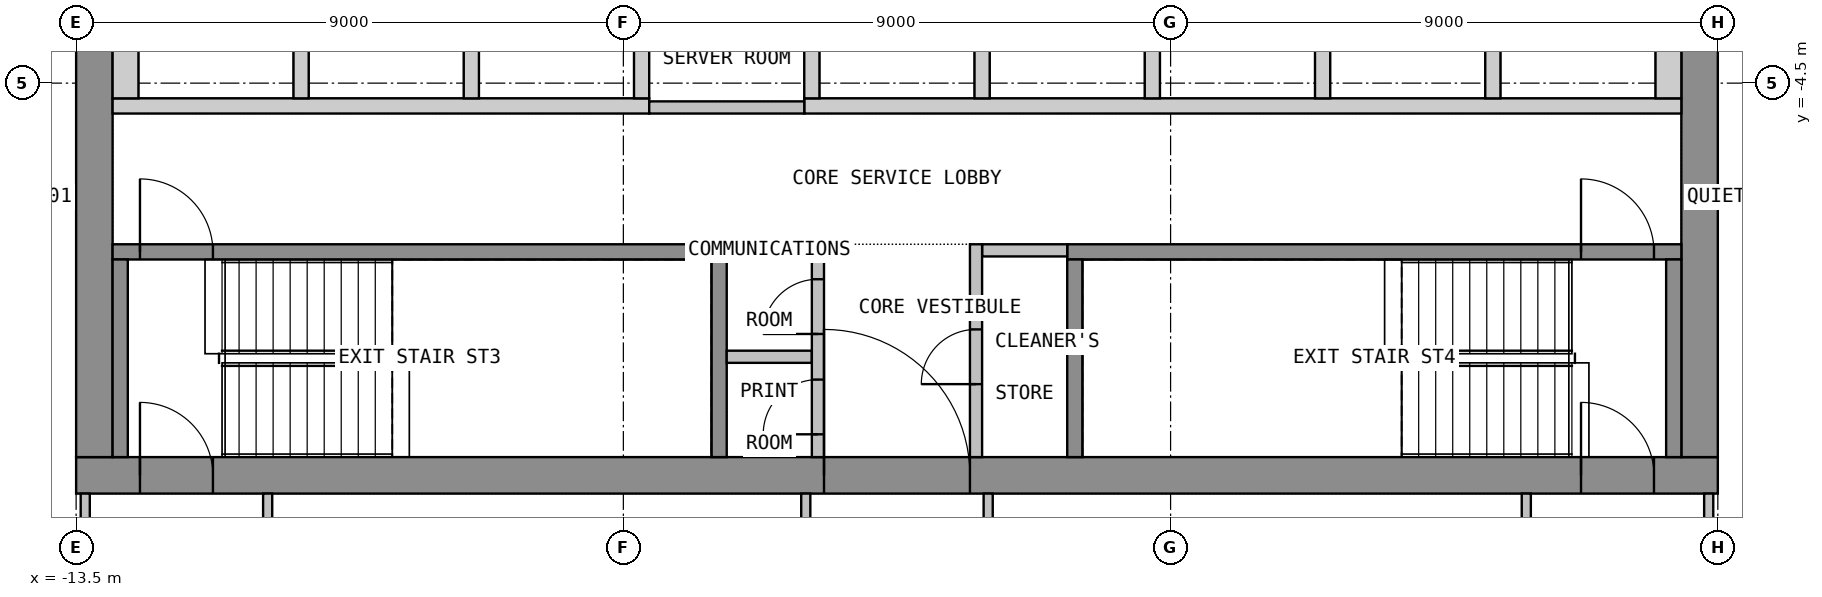
"""IFC4 building model, lengths in metres.
Left out: names, types, materials, properties, quantities, classifications, styles, units other than length and angle.
Written with IfcOpenShell. Run it as: python <this file> out.ifc"""

import sys

from ifc_helpers import new_model, si_unit, direction, frame, frame_2d, origin, place, context, subcontext, project, spatial, polyline, rectangle, outline, extrude, element, fill, save


model = new_model("IFC4")
c1 = context("Model", 3, precision=1e-05, world=origin(), true_north=direction((0.0, 1.0)))
c2 = subcontext(c1, "Body", "Model", "MODEL_VIEW")
j1 = project(units=[si_unit("LENGTHUNIT", "METRE"), si_unit("PLANEANGLEUNIT", "RADIAN")], contexts=[c1])
p1 = place(None, origin())
s1 = spatial("IfcSite", under=j1, at=p1, CompositionType="ELEMENT")
p2 = place(p1, origin())
s2 = spatial("IfcBuilding", under=s1, at=p2, CompositionType="ELEMENT")
p3 = place(p2, frame((0.0, 0.0, 183.9)))
s3 = spatial("IfcBuildingStorey", under=s2, at=p3, CompositionType="ELEMENT", Elevation=183.9)
p4 = place(p3, frame((-13.5, -10.95, 0.0), z_axis=(0.0, 0.0, 1.0), x_axis=(1.0, 0.0, 0.0)))
e1 = element("IfcWall", 1, at=p4, inside=s3, PredefinedType="SHEAR", context=c2, shape_type="SweptSolid", body=[
    extrude(rectangle(XDim=27.0, YDim=0.6, at=frame_2d((13.5, 0.0))), origin(), (0.0, 0.0, 1.0), 3.55),
])
p5 = place(p4, frame((12.3, 0.0, 0.0)))
e2 = element("IfcOpeningElement", 2, at=p5, cuts=e1, PredefinedType="OPENING", context=c2, shape_type="SweptSolid", body=[
    extrude(rectangle(XDim=2.4, YDim=2.1, at=frame_2d((1.2, 1.05))), frame((0.0, 0.31, 0.0), z_axis=(0.0, -1.0, 0.0), x_axis=(1.0, 0.0, 0.0)), (0.0, 0.0, 1.0), 0.62),
])
p6 = place(p4, frame((1.05, 0.0, 0.0)))
e3 = element("IfcOpeningElement", 3, at=p6, cuts=e1, PredefinedType="OPENING", context=c2, shape_type="SweptSolid", body=[
    extrude(rectangle(XDim=1.2, YDim=2.1, at=frame_2d((0.6, 1.05))), frame((0.0, 0.31, 0.0), z_axis=(0.0, -1.0, 0.0), x_axis=(1.0, 0.0, 0.0)), (0.0, 0.0, 1.0), 0.62),
])
p7 = place(p4, frame((24.75, 0.0, 0.0)))
e4 = element("IfcOpeningElement", 4, at=p7, cuts=e1, PredefinedType="OPENING", context=c2, shape_type="SweptSolid", body=[
    extrude(rectangle(XDim=1.2, YDim=2.1, at=frame_2d((0.6, 1.05))), frame((0.0, 0.31, 0.0), z_axis=(0.0, -1.0, 0.0), x_axis=(1.0, 0.0, 0.0)), (0.0, 0.0, 1.0), 0.62),
])
p8 = place(p3, frame((-13.2, -10.65, 0.0), z_axis=(0.0, 0.0, 1.0), x_axis=(0.0, 1.0, 0.0)))
e5 = element("IfcWall", 5, at=p8, inside=s3, PredefinedType="SHEAR", context=c2, shape_type="SweptSolid", body=[
    extrude(rectangle(XDim=21.3, YDim=0.6, at=frame_2d((10.65, 0.0))), origin(), (0.0, 0.0, 1.0), 3.55),
])
p9 = place(p8, frame((9.45, 0.0, 0.0)))
e6 = element("IfcOpeningElement", 6, at=p9, cuts=e5, PredefinedType="OPENING", context=c2, shape_type="SweptSolid", body=[
    extrude(rectangle(XDim=2.4, YDim=2.1, at=frame_2d((1.2, 1.05))), frame((0.0, 0.31, 0.0), z_axis=(0.0, -1.0, 0.0), x_axis=(1.0, 0.0, 0.0)), (0.0, 0.0, 1.0), 0.62),
])
p10 = place(p3, frame((13.2, -10.65, 0.0), z_axis=(0.0, 0.0, 1.0), x_axis=(0.0, 1.0, 0.0)))
e7 = element("IfcWall", 7, at=p10, inside=s3, PredefinedType="SHEAR", context=c2, shape_type="SweptSolid", body=[
    extrude(rectangle(XDim=21.3, YDim=0.6, at=frame_2d((10.65, 0.0))), origin(), (0.0, 0.0, 1.0), 3.55),
])
p11 = place(p10, frame((9.45, 0.0, 0.0)))
e8 = element("IfcOpeningElement", 8, at=p11, cuts=e7, PredefinedType="OPENING", context=c2, shape_type="SweptSolid", body=[
    extrude(rectangle(XDim=2.4, YDim=2.1, at=frame_2d((1.2, 1.05))), frame((0.0, 0.31, 0.0), z_axis=(0.0, -1.0, 0.0), x_axis=(1.0, 0.0, 0.0)), (0.0, 0.0, 1.0), 0.62),
])
p12 = place(p3, origin())
e9 = element("IfcWall", 9, at=p12, inside=s3, PredefinedType="SHEAR", context=c2, shape_type="SweptSolid", body=[
    extrude(outline(polyline([(-12.9, -5.0), (-4.075, -5.0), (-4.075, -4.75), (-12.9, -4.75), (-12.9, -5.0)])), origin(), (0.0, 0.0, 1.0), 3.55),
])
p13 = place(p3, origin())
e10 = element("IfcWall", 10, at=p13, inside=s3, PredefinedType="SHEAR", context=c2, shape_type="SweptSolid", body=[
    extrude(outline(polyline([(-1.525, -5.0), (12.9, -5.0), (12.9, -4.75), (-1.525, -4.75), (-1.525, -5.0)])), origin(), (0.0, 0.0, 1.0), 3.55),
])
p14 = place(p3, origin())
e11 = element("IfcWall", 11, at=p14, inside=s3, PredefinedType="SHEAR", context=c2, shape_type="SweptSolid", body=[
    extrude(outline(polyline([(-12.9, -4.75), (-12.475, -4.75), (-12.475, -3.05), (-12.9, -3.05), (-12.9, -4.75)])), origin(), (0.0, 0.0, 1.0), 3.55),
])
p15 = place(p3, origin())
e12 = element("IfcWall", 12, at=p15, inside=s3, PredefinedType="SHEAR", context=c2, shape_type="SweptSolid", body=[
    extrude(outline(polyline([(-9.925, -4.75), (-9.675, -4.75), (-9.675, -3.05), (-9.925, -3.05), (-9.925, -4.75)])), origin(), (0.0, 0.0, 1.0), 3.55),
])
p16 = place(p3, origin())
e13 = element("IfcWall", 13, at=p16, inside=s3, PredefinedType="SHEAR", context=c2, shape_type="SweptSolid", body=[
    extrude(outline(polyline([(-7.125, -4.75), (-6.875, -4.75), (-6.875, -3.05), (-7.125, -3.05), (-7.125, -4.75)])), origin(), (0.0, 0.0, 1.0), 3.55),
])
p17 = place(p3, origin())
e14 = element("IfcWall", 14, at=p17, inside=s3, PredefinedType="SHEAR", context=c2, shape_type="SweptSolid", body=[
    extrude(outline(polyline([(-4.325, -4.75), (-4.075, -4.75), (-4.075, -3.05), (-4.325, -3.05), (-4.325, -4.75)])), origin(), (0.0, 0.0, 1.0), 3.55),
])
p18 = place(p3, origin())
e15 = element("IfcWall", 15, at=p18, inside=s3, PredefinedType="SHEAR", context=c2, shape_type="SweptSolid", body=[
    extrude(outline(polyline([(-1.525, -4.75), (-1.275, -4.75), (-1.275, -2.05), (-1.525, -2.05), (-1.525, -4.75)])), origin(), (0.0, 0.0, 1.0), 3.55),
])
p19 = place(p3, origin())
e16 = element("IfcWall", 16, at=p19, inside=s3, PredefinedType="SHEAR", context=c2, shape_type="SweptSolid", body=[
    extrude(outline(polyline([(1.275, -4.75), (1.525, -4.75), (1.525, -2.05), (1.275, -2.05), (1.275, -4.75)])), origin(), (0.0, 0.0, 1.0), 3.55),
])
p20 = place(p3, origin())
e17 = element("IfcWall", 17, at=p20, inside=s3, PredefinedType="SHEAR", context=c2, shape_type="SweptSolid", body=[
    extrude(outline(polyline([(4.075, -4.75), (4.325, -4.75), (4.325, -2.05), (4.075, -2.05), (4.075, -4.75)])), origin(), (0.0, 0.0, 1.0), 3.55),
])
p21 = place(p3, origin())
e18 = element("IfcWall", 18, at=p21, inside=s3, PredefinedType="SHEAR", context=c2, shape_type="SweptSolid", body=[
    extrude(outline(polyline([(6.875, -4.75), (7.125, -4.75), (7.125, -2.05), (6.875, -2.05), (6.875, -4.75)])), origin(), (0.0, 0.0, 1.0), 3.55),
])
p22 = place(p3, origin())
e19 = element("IfcWall", 19, at=p22, inside=s3, PredefinedType="SHEAR", context=c2, shape_type="SweptSolid", body=[
    extrude(outline(polyline([(9.675, -4.75), (9.925, -4.75), (9.925, -2.05), (9.675, -2.05), (9.675, -4.75)])), origin(), (0.0, 0.0, 1.0), 3.55),
])
p23 = place(p3, origin())
e20 = element("IfcWall", 20, at=p23, inside=s3, PredefinedType="SHEAR", context=c2, shape_type="SweptSolid", body=[
    extrude(outline(polyline([(12.475, -4.75), (12.9, -4.75), (12.9, -2.05), (12.475, -2.05), (12.475, -4.75)])), origin(), (0.0, 0.0, 1.0), 3.55),
])
p24 = place(p3, frame((-12.9, -7.275, 0.0), z_axis=(0.0, 0.0, 1.0), x_axis=(1.0, 0.0, 0.0)))
e21 = element("IfcWall", 21, at=p24, inside=s3, PredefinedType="SHEAR", context=c2, shape_type="SweptSolid", body=[
    extrude(rectangle(XDim=10.1, YDim=0.25, at=frame_2d((5.05, 0.0))), origin(), (0.0, 0.0, 1.0), 3.55),
])
p25 = place(p24, frame((0.45, 0.0, 0.0)))
e22 = element("IfcOpeningElement", 22, at=p25, cuts=e21, PredefinedType="OPENING", context=c2, shape_type="SweptSolid", body=[
    extrude(rectangle(XDim=1.2, YDim=2.1, at=frame_2d((0.6, 1.05))), frame((0.0, 0.135, 0.0), z_axis=(0.0, -1.0, 0.0), x_axis=(1.0, 0.0, 0.0)), (0.0, 0.0, 1.0), 0.27),
])
for number, where, z_axis, x_axis in (
    (23, (-12.775, -10.65, 0.0), (0.0, 0.0, 1.0), (0.0, 1.0, 0.0)),
    (24, (-2.925, -10.65, 0.0), (0.0, 0.0, 1.0), (0.0, 1.0, 0.0)),
):
    element("IfcWall", number, at=place(p3, frame(where, z_axis=z_axis, x_axis=x_axis)), inside=s3, PredefinedType="SHEAR", context=c2, shape_type="SweptSolid", body=[
        extrude(rectangle(XDim=3.25, YDim=0.25, at=frame_2d((1.625, 0.0))), origin(), (0.0, 0.0, 1.0), 3.55),
    ])
p26 = place(p3, frame((2.8, -7.275, 0.0), z_axis=(0.0, 0.0, 1.0), x_axis=(1.0, 0.0, 0.0)))
e25 = element("IfcWall", 25, at=p26, inside=s3, PredefinedType="SHEAR", context=c2, shape_type="SweptSolid", body=[
    extrude(rectangle(XDim=10.1, YDim=0.25, at=frame_2d((5.05, 0.0))), origin(), (0.0, 0.0, 1.0), 3.55),
])
p27 = place(p26, frame((8.45, 0.0, 0.0)))
e26 = element("IfcOpeningElement", 26, at=p27, cuts=e25, PredefinedType="OPENING", context=c2, shape_type="SweptSolid", body=[
    extrude(rectangle(XDim=1.2, YDim=2.1, at=frame_2d((0.6, 1.05))), frame((0.0, 0.135, 0.0), z_axis=(0.0, -1.0, 0.0), x_axis=(1.0, 0.0, 0.0)), (0.0, 0.0, 1.0), 0.27),
])
for number, where, z_axis, x_axis in (
    (27, (2.925, -10.65, 0.0), (0.0, 0.0, 1.0), (0.0, 1.0, 0.0)),
    (28, (12.775, -10.65, 0.0), (0.0, 0.0, 1.0), (0.0, 1.0, 0.0)),
):
    element("IfcWall", number, at=place(p3, frame(where, z_axis=z_axis, x_axis=x_axis)), inside=s3, PredefinedType="SHEAR", context=c2, shape_type="SweptSolid", body=[
        extrude(rectangle(XDim=3.25, YDim=0.25, at=frame_2d((1.625, 0.0))), origin(), (0.0, 0.0, 1.0), 3.55),
    ])
for number, where, z_axis, x_axis in (
    (29, (-2.8, -7.25, 0.0), (0.0, 0.0, 1.0), (1.0, 0.0, 0.0)),
    (30, (-2.8, -9.0, 0.0), (0.0, 0.0, 1.0), (1.0, 0.0, 0.0)),
    (31, (1.4, -7.25, 0.0), (0.0, 0.0, 1.0), (1.0, 0.0, 0.0)),
):
    element("IfcWall", number, at=place(p3, frame(where, z_axis=z_axis, x_axis=x_axis)), inside=s3, PredefinedType="PARTITIONING", context=c2, shape_type="SweptSolid", body=[
        extrude(rectangle(XDim=1.4, YDim=0.2, at=frame_2d((0.7, 0.0))), origin(), (0.0, 0.0, 1.0), 3.55),
    ])
p28 = place(p3, frame((-1.3, -10.65, 0.0), z_axis=(0.0, 0.0, 1.0), x_axis=(0.0, 1.0, 0.0)))
e32 = element("IfcWall", 32, at=p28, inside=s3, PredefinedType="PARTITIONING", context=c2, shape_type="SweptSolid", body=[
    extrude(rectangle(XDim=3.5, YDim=0.2, at=frame_2d((1.75, 0.0))), origin(), (0.0, 0.0, 1.0), 3.55),
])
p29 = place(p28, frame((0.375, 0.0, 0.0)))
e33 = element("IfcOpeningElement", 33, at=p29, cuts=e32, PredefinedType="OPENING", context=c2, shape_type="SweptSolid", body=[
    extrude(rectangle(XDim=0.9, YDim=2.1, at=frame_2d((0.45, 1.05))), frame((0.0, 0.11, 0.0), z_axis=(0.0, -1.0, 0.0), x_axis=(1.0, 0.0, 0.0)), (0.0, 0.0, 1.0), 0.22),
])
p30 = place(p28, frame((2.025, 0.0, 0.0)))
e34 = element("IfcOpeningElement", 34, at=p30, cuts=e32, PredefinedType="OPENING", context=c2, shape_type="SweptSolid", body=[
    extrude(rectangle(XDim=0.9, YDim=2.1, at=frame_2d((0.45, 1.05))), frame((0.0, 0.11, 0.0), z_axis=(0.0, -1.0, 0.0), x_axis=(1.0, 0.0, 0.0)), (0.0, 0.0, 1.0), 0.22),
])
p31 = place(p3, frame((1.3, -10.65, 0.0), z_axis=(0.0, 0.0, 1.0), x_axis=(0.0, 1.0, 0.0)))
e35 = element("IfcWall", 35, at=p31, inside=s3, PredefinedType="PARTITIONING", context=c2, shape_type="SweptSolid", body=[
    extrude(rectangle(XDim=3.5, YDim=0.2, at=frame_2d((1.75, 0.0))), origin(), (0.0, 0.0, 1.0), 3.55),
])
p32 = place(p31, frame((1.2, 0.0, 0.0)))
e36 = element("IfcOpeningElement", 36, at=p32, cuts=e35, PredefinedType="OPENING", context=c2, shape_type="SweptSolid", body=[
    extrude(rectangle(XDim=0.9, YDim=2.1, at=frame_2d((0.45, 1.05))), frame((0.0, 0.11, 0.0), z_axis=(0.0, -1.0, 0.0), x_axis=(1.0, 0.0, 0.0)), (0.0, 0.0, 1.0), 0.22),
])
p33 = place(p3, frame((-4.075, -4.9, 0.0), z_axis=(0.0, 0.0, 1.0), x_axis=(1.0, 0.0, 0.0)))
e37 = element("IfcWall", 37, at=p33, inside=s3, PredefinedType="PARTITIONING", context=c2, shape_type="SweptSolid", body=[
    extrude(rectangle(XDim=2.55, YDim=0.2, at=frame_2d((1.275, 0.0))), origin(), (0.0, 0.0, 1.0), 3.55),
])
p34 = place(p3, frame((-13.35, -11.25, 0.0), z_axis=(0.0, 0.0, 1.0), x_axis=(0.0, -1.0, 0.0)))
e38 = element("IfcWall", 38, at=p34, inside=s3, PredefinedType="PARTITIONING", context=c2, shape_type="SweptSolid", body=[
    extrude(rectangle(XDim=2.925, YDim=0.15, at=frame_2d((1.462, 0.0))), origin(), (0.0, 0.0, 1.0), 3.55),
])
p35 = place(p3, frame((-10.35, -14.325, 0.0), z_axis=(0.0, 0.0, 1.0), x_axis=(0.0, 1.0, 0.0)))
e39 = element("IfcWall", 39, at=p35, inside=s3, PredefinedType="PARTITIONING", context=c2, shape_type="SweptSolid", body=[
    extrude(rectangle(XDim=3.075, YDim=0.15, at=frame_2d((1.538, 0.0))), origin(), (0.0, 0.0, 1.0), 3.55),
])
p36 = place(p3, frame((-1.5, -11.25, 0.0), z_axis=(0.0, 0.0, 1.0), x_axis=(0.0, -1.0, 0.0)))
e40 = element("IfcWall", 40, at=p36, inside=s3, PredefinedType="PARTITIONING", context=c2, shape_type="SweptSolid", body=[
    extrude(rectangle(XDim=2.925, YDim=0.15, at=frame_2d((1.462, 0.0))), origin(), (0.0, 0.0, 1.0), 3.55),
])
p37 = place(p3, frame((1.5, -14.325, 0.0), z_axis=(0.0, 0.0, 1.0), x_axis=(0.0, 1.0, 0.0)))
e41 = element("IfcWall", 41, at=p37, inside=s3, PredefinedType="PARTITIONING", context=c2, shape_type="SweptSolid", body=[
    extrude(rectangle(XDim=3.075, YDim=0.15, at=frame_2d((1.538, 0.0))), origin(), (0.0, 0.0, 1.0), 3.55),
])
p38 = place(p3, frame((10.35, -11.25, 0.0), z_axis=(0.0, 0.0, 1.0), x_axis=(0.0, -1.0, 0.0)))
e42 = element("IfcWall", 42, at=p38, inside=s3, PredefinedType="PARTITIONING", context=c2, shape_type="SweptSolid", body=[
    extrude(rectangle(XDim=2.925, YDim=0.15, at=frame_2d((1.462, 0.0))), origin(), (0.0, 0.0, 1.0), 3.55),
])
p39 = place(p3, frame((13.35, -14.325, 0.0), z_axis=(0.0, 0.0, 1.0), x_axis=(0.0, 1.0, 0.0)))
e43 = element("IfcWall", 43, at=p39, inside=s3, PredefinedType="PARTITIONING", context=c2, shape_type="SweptSolid", body=[
    extrude(rectangle(XDim=3.075, YDim=0.15, at=frame_2d((1.538, 0.0))), origin(), (0.0, 0.0, 1.0), 3.55),
])
p40 = place(p5, origin())
e44 = element("IfcDoor", 44, at=p40, inside=s3, OperationType="DOUBLE_DOOR_DOUBLE_SWING", PredefinedType="DOOR", context=c2, shape_type="SweptSolid", body=[
    extrude(rectangle(XDim=2.4, YDim=2.1, at=frame_2d((1.2, 1.05))), frame((0.0, 0.025, 0.0), z_axis=(0.0, -1.0, 0.0), x_axis=(1.0, 0.0, 0.0)), (0.0, 0.0, 1.0), 0.05),
])
fill(e2, e44)
p41 = place(p6, origin())
e45 = element("IfcDoor", 45, at=p41, inside=s3, OperationType="SINGLE_SWING_RIGHT", PredefinedType="DOOR", context=c2, shape_type="SweptSolid", body=[
    extrude(rectangle(XDim=1.2, YDim=2.1, at=frame_2d((0.6, 1.05))), frame((0.0, 0.025, 0.0), z_axis=(0.0, -1.0, 0.0), x_axis=(1.0, 0.0, 0.0)), (0.0, 0.0, 1.0), 0.05),
])
fill(e3, e45)
p42 = place(p7, origin())
e46 = element("IfcDoor", 46, at=p42, inside=s3, OperationType="SINGLE_SWING_RIGHT", PredefinedType="DOOR", context=c2, shape_type="SweptSolid", body=[
    extrude(rectangle(XDim=1.2, YDim=2.1, at=frame_2d((0.6, 1.05))), frame((0.0, 0.025, 0.0), z_axis=(0.0, -1.0, 0.0), x_axis=(1.0, 0.0, 0.0)), (0.0, 0.0, 1.0), 0.05),
])
fill(e4, e46)
p43 = place(p25, origin())
e47 = element("IfcDoor", 47, at=p43, inside=s3, OperationType="SINGLE_SWING_LEFT", PredefinedType="DOOR", context=c2, shape_type="SweptSolid", body=[
    extrude(rectangle(XDim=1.2, YDim=2.1, at=frame_2d((0.6, 1.05))), frame((0.0, 0.025, 0.0), z_axis=(0.0, -1.0, 0.0), x_axis=(1.0, 0.0, 0.0)), (0.0, 0.0, 1.0), 0.05),
])
fill(e22, e47)
p44 = place(p27, origin())
e48 = element("IfcDoor", 48, at=p44, inside=s3, OperationType="SINGLE_SWING_LEFT", PredefinedType="DOOR", context=c2, shape_type="SweptSolid", body=[
    extrude(rectangle(XDim=1.2, YDim=2.1, at=frame_2d((0.6, 1.05))), frame((0.0, 0.025, 0.0), z_axis=(0.0, -1.0, 0.0), x_axis=(1.0, 0.0, 0.0)), (0.0, 0.0, 1.0), 0.05),
])
fill(e26, e48)
p45 = place(p29, origin())
e49 = element("IfcDoor", 49, at=p45, inside=s3, OperationType="SINGLE_SWING_LEFT", PredefinedType="DOOR", context=c2, shape_type="SweptSolid", body=[
    extrude(rectangle(XDim=0.9, YDim=2.1, at=frame_2d((0.45, 1.05))), frame((0.0, 0.025, 0.0), z_axis=(0.0, -1.0, 0.0), x_axis=(1.0, 0.0, 0.0)), (0.0, 0.0, 1.0), 0.05),
])
fill(e33, e49)
p46 = place(p30, origin())
e50 = element("IfcDoor", 50, at=p46, inside=s3, OperationType="SINGLE_SWING_LEFT", PredefinedType="DOOR", context=c2, shape_type="SweptSolid", body=[
    extrude(rectangle(XDim=0.9, YDim=2.1, at=frame_2d((0.45, 1.05))), frame((0.0, 0.025, 0.0), z_axis=(0.0, -1.0, 0.0), x_axis=(1.0, 0.0, 0.0)), (0.0, 0.0, 1.0), 0.05),
])
fill(e34, e50)
p47 = place(p32, origin())
e51 = element("IfcDoor", 51, at=p47, inside=s3, OperationType="SINGLE_SWING_LEFT", PredefinedType="DOOR", context=c2, shape_type="SweptSolid", body=[
    extrude(rectangle(XDim=0.9, YDim=2.1, at=frame_2d((0.45, 1.05))), frame((0.0, 0.025, 0.0), z_axis=(0.0, -1.0, 0.0), x_axis=(1.0, 0.0, 0.0)), (0.0, 0.0, 1.0), 0.05),
])
fill(e36, e51)
save(model, sys.argv[1])
